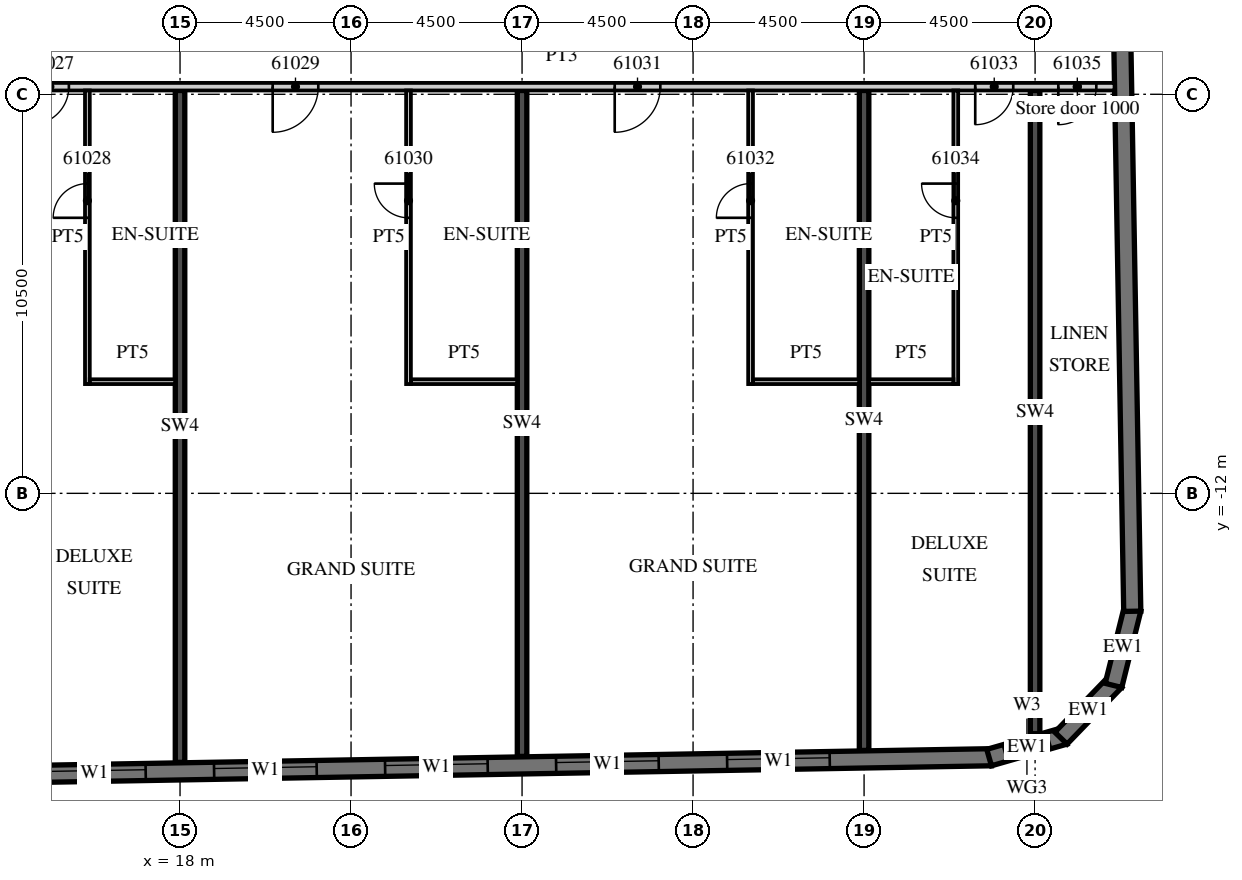
"""IFC4 building model, lengths in metres.
Left out: names, types, materials, properties, quantities, classifications, styles, units other than length and angle.
Written with IfcOpenShell. Run it as: python <this file> out.ifc"""

import sys

from ifc_helpers import new_model, si_unit, direction, frame, frame_2d, origin, place, context, subcontext, project, spatial, polyline, rectangle, outline, extrude, element, fill, save


model = new_model("IFC4")
c1 = context("Model", 3, precision=1e-05, world=origin(), true_north=direction((0.0, 1.0)))
c2 = subcontext(c1, "Body", "Model", "MODEL_VIEW")
j1 = project(units=[si_unit("LENGTHUNIT", "METRE"), si_unit("PLANEANGLEUNIT", "RADIAN")], contexts=[c1])
p1 = place(None, origin())
s1 = spatial("IfcSite", under=j1, at=p1, CompositionType="ELEMENT")
p2 = place(p1, origin())
s2 = spatial("IfcBuilding", under=s1, at=p2, CompositionType="ELEMENT")
p3 = place(p2, frame((0.0, 0.0, 247.4)))
s3 = spatial("IfcBuildingStorey", under=s2, at=p3, CompositionType="ELEMENT", Elevation=247.4)
p4 = place(p3, frame((18.0, -19.079, 0.0), z_axis=(0.0, 0.0, 1.0), x_axis=(0.0, 1.0, 0.0)))
e1 = element("IfcWall", 1, at=p4, inside=s3, PredefinedType="SHEAR", context=c2, shape_type="SweptSolid", body=[
    extrude(rectangle(XDim=17.679, YDim=0.25, at=frame_2d((8.84, 0.0))), origin(), (0.0, 0.0, 1.0), 3.3),
])
p5 = place(p3, frame((27.0, -18.922, 0.0), z_axis=(0.0, 0.0, 1.0), x_axis=(0.0, 1.0, 0.0)))
e2 = element("IfcWall", 2, at=p5, inside=s3, PredefinedType="SHEAR", context=c2, shape_type="SweptSolid", body=[
    extrude(rectangle(XDim=17.522, YDim=0.25, at=frame_2d((8.761, 0.0))), origin(), (0.0, 0.0, 1.0), 3.3),
])
p6 = place(p3, frame((36.0, -18.765, 0.0), z_axis=(0.0, 0.0, 1.0), x_axis=(0.0, 1.0, 0.0)))
e3 = element("IfcWall", 3, at=p6, inside=s3, PredefinedType="SHEAR", context=c2, shape_type="SweptSolid", body=[
    extrude(rectangle(XDim=17.365, YDim=0.25, at=frame_2d((8.683, 0.0))), origin(), (0.0, 0.0, 1.0), 3.3),
])
p7 = place(p3, frame((40.5, -18.325, 0.0), z_axis=(0.0, 0.0, 1.0), x_axis=(0.0, 1.0, 0.0)))
e4 = element("IfcWall", 4, at=p7, inside=s3, PredefinedType="SHEAR", context=c2, shape_type="SweptSolid", body=[
    extrude(rectangle(XDim=16.925, YDim=0.25, at=frame_2d((8.463, 0.0))), origin(), (0.0, 0.0, 1.0), 3.3),
])
p8 = place(p3, frame((-13.504, -19.866, 0.0), z_axis=(0.0, 0.0, 1.0), x_axis=(0.999847672978, 0.017453676992, 0.0)))
e5 = element("IfcWall", 5, at=p8, inside=s3, PredefinedType="SOLIDWALL", context=c2, shape_type="SweptSolid", body=[
    extrude(rectangle(XDim=52.86, YDim=0.45, at=frame_2d((26.43, 0.0))), origin(), (0.0, 0.0, 1.0), 3.02),
])
p9 = place(p8, frame((0.9, 0.0, 0.45)))
e6 = element("IfcOpeningElement", 6, at=p9, cuts=e5, PredefinedType="OPENING", context=c2, shape_type="SweptSolid", body=[
    extrude(rectangle(XDim=2.7, YDim=2.25, at=frame_2d((1.35, 1.125))), frame((0.0, 0.235, 0.0), z_axis=(0.0, -1.0, 0.0), x_axis=(1.0, 0.0, 0.0)), (0.0, 0.0, 1.0), 0.47),
])
p10 = place(p8, frame((5.401, 0.0, 0.45)))
e7 = element("IfcOpeningElement", 7, at=p10, cuts=e5, PredefinedType="OPENING", context=c2, shape_type="SweptSolid", body=[
    extrude(rectangle(XDim=2.7, YDim=2.25, at=frame_2d((1.35, 1.125))), frame((0.0, 0.235, 0.0), z_axis=(0.0, -1.0, 0.0), x_axis=(1.0, 0.0, 0.0)), (0.0, 0.0, 1.0), 0.47),
])
p11 = place(p8, frame((9.902, 0.0, 0.45)))
e8 = element("IfcOpeningElement", 8, at=p11, cuts=e5, PredefinedType="OPENING", context=c2, shape_type="SweptSolid", body=[
    extrude(rectangle(XDim=2.7, YDim=2.25, at=frame_2d((1.35, 1.125))), frame((0.0, 0.235, 0.0), z_axis=(0.0, -1.0, 0.0), x_axis=(1.0, 0.0, 0.0)), (0.0, 0.0, 1.0), 0.47),
])
p12 = place(p8, frame((14.402, 0.0, 0.45)))
e9 = element("IfcOpeningElement", 9, at=p12, cuts=e5, PredefinedType="OPENING", context=c2, shape_type="SweptSolid", body=[
    extrude(rectangle(XDim=2.7, YDim=2.25, at=frame_2d((1.35, 1.125))), frame((0.0, 0.235, 0.0), z_axis=(0.0, -1.0, 0.0), x_axis=(1.0, 0.0, 0.0)), (0.0, 0.0, 1.0), 0.47),
])
p13 = place(p8, frame((18.903, 0.0, 0.45)))
e10 = element("IfcOpeningElement", 10, at=p13, cuts=e5, PredefinedType="OPENING", context=c2, shape_type="SweptSolid", body=[
    extrude(rectangle(XDim=2.7, YDim=2.25, at=frame_2d((1.35, 1.125))), frame((0.0, 0.235, 0.0), z_axis=(0.0, -1.0, 0.0), x_axis=(1.0, 0.0, 0.0)), (0.0, 0.0, 1.0), 0.47),
])
p14 = place(p8, frame((23.404, 0.0, 0.45)))
e11 = element("IfcOpeningElement", 11, at=p14, cuts=e5, PredefinedType="OPENING", context=c2, shape_type="SweptSolid", body=[
    extrude(rectangle(XDim=2.7, YDim=2.25, at=frame_2d((1.35, 1.125))), frame((0.0, 0.235, 0.0), z_axis=(0.0, -1.0, 0.0), x_axis=(1.0, 0.0, 0.0)), (0.0, 0.0, 1.0), 0.47),
])
p15 = place(p8, frame((27.904, 0.0, 0.45)))
e12 = element("IfcOpeningElement", 12, at=p15, cuts=e5, PredefinedType="OPENING", context=c2, shape_type="SweptSolid", body=[
    extrude(rectangle(XDim=2.7, YDim=2.25, at=frame_2d((1.35, 1.125))), frame((0.0, 0.235, 0.0), z_axis=(0.0, -1.0, 0.0), x_axis=(1.0, 0.0, 0.0)), (0.0, 0.0, 1.0), 0.47),
])
p16 = place(p8, frame((32.405, 0.0, 0.45)))
e13 = element("IfcOpeningElement", 13, at=p16, cuts=e5, PredefinedType="OPENING", context=c2, shape_type="SweptSolid", body=[
    extrude(rectangle(XDim=2.7, YDim=2.25, at=frame_2d((1.35, 1.125))), frame((0.0, 0.235, 0.0), z_axis=(0.0, -1.0, 0.0), x_axis=(1.0, 0.0, 0.0)), (0.0, 0.0, 1.0), 0.47),
])
p17 = place(p8, frame((36.906, 0.0, 0.45)))
e14 = element("IfcOpeningElement", 14, at=p17, cuts=e5, PredefinedType="OPENING", context=c2, shape_type="SweptSolid", body=[
    extrude(rectangle(XDim=2.7, YDim=2.25, at=frame_2d((1.35, 1.125))), frame((0.0, 0.235, 0.0), z_axis=(0.0, -1.0, 0.0), x_axis=(1.0, 0.0, 0.0)), (0.0, 0.0, 1.0), 0.47),
])
p18 = place(p8, frame((41.406, 0.0, 0.45)))
e15 = element("IfcOpeningElement", 15, at=p18, cuts=e5, PredefinedType="OPENING", context=c2, shape_type="SweptSolid", body=[
    extrude(rectangle(XDim=2.7, YDim=2.25, at=frame_2d((1.35, 1.125))), frame((0.0, 0.235, 0.0), z_axis=(0.0, -1.0, 0.0), x_axis=(1.0, 0.0, 0.0)), (0.0, 0.0, 1.0), 0.47),
])
p19 = place(p8, frame((45.907, 0.0, 0.45)))
e16 = element("IfcOpeningElement", 16, at=p19, cuts=e5, PredefinedType="OPENING", context=c2, shape_type="SweptSolid", body=[
    extrude(rectangle(XDim=2.7, YDim=2.25, at=frame_2d((1.35, 1.125))), frame((0.0, 0.235, 0.0), z_axis=(0.0, -1.0, 0.0), x_axis=(1.0, 0.0, 0.0)), (0.0, 0.0, 1.0), 0.47),
])
p20 = place(p3, frame((39.29, -18.952, 0.0), z_axis=(0.0, 0.0, 1.0), x_axis=(0.961247584925, 0.275686562016, 0.0)))
e17 = element("IfcWall", 17, at=p20, inside=s3, PredefinedType="SOLIDWALL", context=c2, shape_type="SweptSolid", body=[
    extrude(outline(polyline([(0.0, -0.225), (2.071, -0.225), (1.95, 0.225), (0.121, 0.225), (0.0, -0.225)])), origin(), (0.0, 0.0, 1.0), 3.02),
])
p21 = place(p20, frame((0.435, 0.0, 0.45)))
e18 = element("IfcOpeningElement", 18, at=p21, cuts=e17, PredefinedType="OPENING", context=c2, shape_type="SweptSolid", body=[
    extrude(rectangle(XDim=1.2, YDim=2.25, at=frame_2d((0.6, 1.125))), frame((0.0, 0.235, 0.0), z_axis=(0.0, -1.0, 0.0), x_axis=(1.0, 0.0, 0.0)), (0.0, 0.0, 1.0), 0.47),
])
p22 = place(p3, frame((41.181, -18.442, 0.0), z_axis=(0.0, 0.0, 1.0), x_axis=(0.694678672846, 0.719320193998, 0.0)))
e19 = element("IfcWall", 19, at=p22, inside=s3, PredefinedType="SOLIDWALL", context=c2, shape_type="SweptSolid", body=[
    extrude(outline(polyline([(0.0, -0.225), (2.071, -0.225), (1.95, 0.225), (0.121, 0.225), (0.0, -0.225)])), origin(), (0.0, 0.0, 1.0), 3.02),
])
p23 = place(p3, frame((42.563, -17.054, 0.0), z_axis=(0.0, 0.0, 1.0), x_axis=(0.241841950319, 0.970315655375, 0.0)))
e20 = element("IfcWall", 20, at=p23, inside=s3, PredefinedType="SOLIDWALL", context=c2, shape_type="SweptSolid", body=[
    extrude(outline(polyline([(0.0, -0.225), (2.071, -0.225), (1.95, 0.225), (0.121, 0.225), (0.0, -0.225)])), origin(), (0.0, 0.0, 1.0), 3.02),
])
p24 = place(p3, frame((43.057, -15.103, 0.0), z_axis=(0.0, 0.0, 1.0), x_axis=(-0.017452408953, 0.999847695112, 0.0)))
e21 = element("IfcWall", 21, at=p24, inside=s3, PredefinedType="SOLIDWALL", context=c2, shape_type="SweptSolid", body=[
    extrude(rectangle(XDim=33.0, YDim=0.45, at=frame_2d((16.5, 0.0))), origin(), (0.0, 0.0, 1.0), 3.02),
])
p25 = place(p3, frame((13.5, -1.3, 0.0), z_axis=(0.0, 0.0, 1.0), x_axis=(1.0, 0.0, 0.0)))
e22 = element("IfcWall", 22, at=p25, inside=s3, PredefinedType="PARTITIONING", context=c2, shape_type="SweptSolid", body=[
    extrude(rectangle(XDim=29.091, YDim=0.2, at=frame_2d((14.545, 0.0))), origin(), (0.0, 0.0, 1.0), 3.02),
])
p26 = place(p25, frame((0.575, 0.0, 0.0)))
e23 = element("IfcOpeningElement", 23, at=p26, cuts=e22, PredefinedType="OPENING", context=c2, shape_type="SweptSolid", body=[
    extrude(rectangle(XDim=1.0, YDim=2.1, at=frame_2d((0.5, 1.05))), frame((0.0, 0.11, 0.0), z_axis=(0.0, -1.0, 0.0), x_axis=(1.0, 0.0, 0.0)), (0.0, 0.0, 1.0), 0.22),
])
p27 = place(p25, frame((6.938, 0.0, 0.0)))
e24 = element("IfcOpeningElement", 24, at=p27, cuts=e22, PredefinedType="OPENING", context=c2, shape_type="SweptSolid", body=[
    extrude(rectangle(XDim=1.2, YDim=2.1, at=frame_2d((0.6, 1.05))), frame((0.0, 0.11, 0.0), z_axis=(0.0, -1.0, 0.0), x_axis=(1.0, 0.0, 0.0)), (0.0, 0.0, 1.0), 0.22),
])
p28 = place(p25, frame((15.938, 0.0, 0.0)))
e25 = element("IfcOpeningElement", 25, at=p28, cuts=e22, PredefinedType="OPENING", context=c2, shape_type="SweptSolid", body=[
    extrude(rectangle(XDim=1.2, YDim=2.1, at=frame_2d((0.6, 1.05))), frame((0.0, 0.11, 0.0), z_axis=(0.0, -1.0, 0.0), x_axis=(1.0, 0.0, 0.0)), (0.0, 0.0, 1.0), 0.22),
])
p29 = place(p25, frame((25.425, 0.0, 0.0)))
e26 = element("IfcOpeningElement", 26, at=p29, cuts=e22, PredefinedType="OPENING", context=c2, shape_type="SweptSolid", body=[
    extrude(rectangle(XDim=1.0, YDim=2.1, at=frame_2d((0.5, 1.05))), frame((0.0, 0.11, 0.0), z_axis=(0.0, -1.0, 0.0), x_axis=(1.0, 0.0, 0.0)), (0.0, 0.0, 1.0), 0.22),
])
p30 = place(p25, frame((27.611, 0.0, 0.0)))
e27 = element("IfcOpeningElement", 27, at=p30, cuts=e22, PredefinedType="OPENING", context=c2, shape_type="SweptSolid", body=[
    extrude(rectangle(XDim=1.0, YDim=2.4, at=frame_2d((0.5, 1.2))), frame((0.0, 0.11, 0.0), z_axis=(0.0, -1.0, 0.0), x_axis=(1.0, 0.0, 0.0)), (0.0, 0.0, 1.0), 0.22),
])
p31 = place(p3, frame((15.562, -9.125, 0.0), z_axis=(0.0, 0.0, 1.0), x_axis=(0.0, 1.0, 0.0)))
e28 = element("IfcWall", 28, at=p31, inside=s3, PredefinedType="PARTITIONING", context=c2, shape_type="SweptSolid", body=[
    extrude(rectangle(XDim=7.725, YDim=0.125, at=frame_2d((3.863, 0.0))), origin(), (0.0, 0.0, 1.0), 3.02),
])
p32 = place(p31, frame((4.375, 0.0, 0.0)))
e29 = element("IfcOpeningElement", 29, at=p32, cuts=e28, PredefinedType="OPENING", context=c2, shape_type="SweptSolid", body=[
    extrude(rectangle(XDim=0.9, YDim=2.1, at=frame_2d((0.45, 1.05))), frame((0.0, 0.073, 0.0), z_axis=(0.0, -1.0, 0.0), x_axis=(1.0, 0.0, 0.0)), (0.0, 0.0, 1.0), 0.145),
])
p33 = place(p3, frame((15.625, -9.062, 0.0), z_axis=(0.0, 0.0, 1.0), x_axis=(1.0, 0.0, 0.0)))
e30 = element("IfcWall", 30, at=p33, inside=s3, PredefinedType="PARTITIONING", context=c2, shape_type="SweptSolid", body=[
    extrude(rectangle(XDim=2.25, YDim=0.125, at=frame_2d((1.125, 0.0))), origin(), (0.0, 0.0, 1.0), 3.02),
])
p34 = place(p3, frame((24.012, -9.125, 0.0), z_axis=(0.0, 0.0, 1.0), x_axis=(0.0, 1.0, 0.0)))
e31 = element("IfcWall", 31, at=p34, inside=s3, PredefinedType="PARTITIONING", context=c2, shape_type="SweptSolid", body=[
    extrude(rectangle(XDim=7.725, YDim=0.125, at=frame_2d((3.863, 0.0))), origin(), (0.0, 0.0, 1.0), 3.02),
])
p35 = place(p34, frame((4.375, 0.0, 0.0)))
e32 = element("IfcOpeningElement", 32, at=p35, cuts=e31, PredefinedType="OPENING", context=c2, shape_type="SweptSolid", body=[
    extrude(rectangle(XDim=0.9, YDim=2.1, at=frame_2d((0.45, 1.05))), frame((0.0, 0.073, 0.0), z_axis=(0.0, -1.0, 0.0), x_axis=(1.0, 0.0, 0.0)), (0.0, 0.0, 1.0), 0.145),
])
p36 = place(p3, frame((24.075, -9.062, 0.0), z_axis=(0.0, 0.0, 1.0), x_axis=(1.0, 0.0, 0.0)))
e33 = element("IfcWall", 33, at=p36, inside=s3, PredefinedType="PARTITIONING", context=c2, shape_type="SweptSolid", body=[
    extrude(rectangle(XDim=2.8, YDim=0.125, at=frame_2d((1.4, 0.0))), origin(), (0.0, 0.0, 1.0), 3.02),
])
p37 = place(p3, frame((33.013, -9.125, 0.0), z_axis=(0.0, 0.0, 1.0), x_axis=(0.0, 1.0, 0.0)))
e34 = element("IfcWall", 34, at=p37, inside=s3, PredefinedType="PARTITIONING", context=c2, shape_type="SweptSolid", body=[
    extrude(rectangle(XDim=7.725, YDim=0.125, at=frame_2d((3.863, 0.0))), origin(), (0.0, 0.0, 1.0), 3.02),
])
p38 = place(p37, frame((4.375, 0.0, 0.0)))
e35 = element("IfcOpeningElement", 35, at=p38, cuts=e34, PredefinedType="OPENING", context=c2, shape_type="SweptSolid", body=[
    extrude(rectangle(XDim=0.9, YDim=2.1, at=frame_2d((0.45, 1.05))), frame((0.0, 0.073, 0.0), z_axis=(0.0, -1.0, 0.0), x_axis=(1.0, 0.0, 0.0)), (0.0, 0.0, 1.0), 0.145),
])
p39 = place(p3, frame((33.075, -9.062, 0.0), z_axis=(0.0, 0.0, 1.0), x_axis=(1.0, 0.0, 0.0)))
e36 = element("IfcWall", 36, at=p39, inside=s3, PredefinedType="PARTITIONING", context=c2, shape_type="SweptSolid", body=[
    extrude(rectangle(XDim=2.8, YDim=0.125, at=frame_2d((1.4, 0.0))), origin(), (0.0, 0.0, 1.0), 3.02),
])
p40 = place(p3, frame((38.413, -9.125, 0.0), z_axis=(0.0, 0.0, 1.0), x_axis=(0.0, 1.0, 0.0)))
e37 = element("IfcWall", 37, at=p40, inside=s3, PredefinedType="PARTITIONING", context=c2, shape_type="SweptSolid", body=[
    extrude(rectangle(XDim=7.725, YDim=0.125, at=frame_2d((3.863, 0.0))), origin(), (0.0, 0.0, 1.0), 3.02),
])
p41 = place(p40, frame((4.375, 0.0, 0.0)))
e38 = element("IfcOpeningElement", 38, at=p41, cuts=e37, PredefinedType="OPENING", context=c2, shape_type="SweptSolid", body=[
    extrude(rectangle(XDim=0.9, YDim=2.1, at=frame_2d((0.45, 1.05))), frame((0.0, 0.073, 0.0), z_axis=(0.0, -1.0, 0.0), x_axis=(1.0, 0.0, 0.0)), (0.0, 0.0, 1.0), 0.145),
])
p42 = place(p3, frame((36.125, -9.062, 0.0), z_axis=(0.0, 0.0, 1.0), x_axis=(1.0, 0.0, 0.0)))
e39 = element("IfcWall", 39, at=p42, inside=s3, PredefinedType="PARTITIONING", context=c2, shape_type="SweptSolid", body=[
    extrude(rectangle(XDim=2.225, YDim=0.125, at=frame_2d((1.113, 0.0))), origin(), (0.0, 0.0, 1.0), 3.02),
])
p43 = place(p15, origin())
e40 = element("IfcWindow", 40, at=p43, inside=s3, PartitioningType="SINGLE_PANEL", PredefinedType="WINDOW", context=c2, shape_type="SweptSolid", body=[
    extrude(rectangle(XDim=2.7, YDim=2.25, at=frame_2d((1.35, 1.125))), frame((0.0, 0.09, 0.0), z_axis=(0.0, -1.0, 0.0), x_axis=(1.0, 0.0, 0.0)), (0.0, 0.0, 1.0), 0.06),
])
fill(e12, e40)
p44 = place(p16, origin())
e41 = element("IfcWindow", 41, at=p44, inside=s3, PartitioningType="SINGLE_PANEL", PredefinedType="WINDOW", context=c2, shape_type="SweptSolid", body=[
    extrude(rectangle(XDim=2.7, YDim=2.25, at=frame_2d((1.35, 1.125))), frame((0.0, 0.09, 0.0), z_axis=(0.0, -1.0, 0.0), x_axis=(1.0, 0.0, 0.0)), (0.0, 0.0, 1.0), 0.06),
])
fill(e13, e41)
p45 = place(p17, origin())
e42 = element("IfcWindow", 42, at=p45, inside=s3, PartitioningType="SINGLE_PANEL", PredefinedType="WINDOW", context=c2, shape_type="SweptSolid", body=[
    extrude(rectangle(XDim=2.7, YDim=2.25, at=frame_2d((1.35, 1.125))), frame((0.0, 0.09, 0.0), z_axis=(0.0, -1.0, 0.0), x_axis=(1.0, 0.0, 0.0)), (0.0, 0.0, 1.0), 0.06),
])
fill(e14, e42)
p46 = place(p18, origin())
e43 = element("IfcWindow", 43, at=p46, inside=s3, PartitioningType="SINGLE_PANEL", PredefinedType="WINDOW", context=c2, shape_type="SweptSolid", body=[
    extrude(rectangle(XDim=2.7, YDim=2.25, at=frame_2d((1.35, 1.125))), frame((0.0, 0.09, 0.0), z_axis=(0.0, -1.0, 0.0), x_axis=(1.0, 0.0, 0.0)), (0.0, 0.0, 1.0), 0.06),
])
fill(e15, e43)
p47 = place(p19, origin())
e44 = element("IfcWindow", 44, at=p47, inside=s3, PartitioningType="SINGLE_PANEL", PredefinedType="WINDOW", context=c2, shape_type="SweptSolid", body=[
    extrude(rectangle(XDim=2.7, YDim=2.25, at=frame_2d((1.35, 1.125))), frame((0.0, 0.09, 0.0), z_axis=(0.0, -1.0, 0.0), x_axis=(1.0, 0.0, 0.0)), (0.0, 0.0, 1.0), 0.06),
])
fill(e16, e44)
p48 = place(p21, origin())
e45 = element("IfcWindow", 45, at=p48, inside=s3, PartitioningType="SINGLE_PANEL", PredefinedType="WINDOW", context=c2, shape_type="SweptSolid", body=[
    extrude(rectangle(XDim=1.2, YDim=2.25, at=frame_2d((0.6, 1.125))), frame((0.0, 0.09, 0.0), z_axis=(0.0, -1.0, 0.0), x_axis=(1.0, 0.0, 0.0)), (0.0, 0.0, 1.0), 0.06),
])
fill(e18, e45)
p49 = place(p26, origin())
e46 = element("IfcDoor", 46, at=p49, inside=s3, OperationType="SINGLE_SWING_LEFT", PredefinedType="DOOR", context=c2, shape_type="SweptSolid", body=[
    extrude(rectangle(XDim=1.0, YDim=2.1, at=frame_2d((0.5, 1.05))), frame((0.0, 0.025, 0.0), z_axis=(0.0, -1.0, 0.0), x_axis=(1.0, 0.0, 0.0)), (0.0, 0.0, 1.0), 0.05),
])
fill(e23, e46)
p50 = place(p32, origin())
e47 = element("IfcDoor", 47, at=p50, inside=s3, OperationType="SINGLE_SWING_LEFT", PredefinedType="DOOR", context=c2, shape_type="SweptSolid", body=[
    extrude(rectangle(XDim=0.9, YDim=2.1, at=frame_2d((0.45, 1.05))), frame((0.0, 0.025, 0.0), z_axis=(0.0, -1.0, 0.0), x_axis=(1.0, 0.0, 0.0)), (0.0, 0.0, 1.0), 0.05),
])
fill(e29, e47)
p51 = place(p27, origin())
e48 = element("IfcDoor", 48, at=p51, inside=s3, OperationType="SINGLE_SWING_LEFT", PredefinedType="DOOR", context=c2, shape_type="SweptSolid", body=[
    extrude(rectangle(XDim=1.2, YDim=2.1, at=frame_2d((0.6, 1.05))), frame((0.0, 0.025, 0.0), z_axis=(0.0, -1.0, 0.0), x_axis=(1.0, 0.0, 0.0)), (0.0, 0.0, 1.0), 0.05),
])
fill(e24, e48)
p52 = place(p35, origin())
e49 = element("IfcDoor", 49, at=p52, inside=s3, OperationType="SINGLE_SWING_RIGHT", PredefinedType="DOOR", context=c2, shape_type="SweptSolid", body=[
    extrude(rectangle(XDim=0.9, YDim=2.1, at=frame_2d((0.45, 1.05))), frame((0.0, 0.025, 0.0), z_axis=(0.0, -1.0, 0.0), x_axis=(1.0, 0.0, 0.0)), (0.0, 0.0, 1.0), 0.05),
])
fill(e32, e49)
p53 = place(p28, origin())
e50 = element("IfcDoor", 50, at=p53, inside=s3, OperationType="SINGLE_SWING_LEFT", PredefinedType="DOOR", context=c2, shape_type="SweptSolid", body=[
    extrude(rectangle(XDim=1.2, YDim=2.1, at=frame_2d((0.6, 1.05))), frame((0.0, 0.025, 0.0), z_axis=(0.0, -1.0, 0.0), x_axis=(1.0, 0.0, 0.0)), (0.0, 0.0, 1.0), 0.05),
])
fill(e25, e50)
p54 = place(p38, origin())
e51 = element("IfcDoor", 51, at=p54, inside=s3, OperationType="SINGLE_SWING_LEFT", PredefinedType="DOOR", context=c2, shape_type="SweptSolid", body=[
    extrude(rectangle(XDim=0.9, YDim=2.1, at=frame_2d((0.45, 1.05))), frame((0.0, 0.025, 0.0), z_axis=(0.0, -1.0, 0.0), x_axis=(1.0, 0.0, 0.0)), (0.0, 0.0, 1.0), 0.05),
])
fill(e35, e51)
p55 = place(p29, origin())
e52 = element("IfcDoor", 52, at=p55, inside=s3, OperationType="SINGLE_SWING_LEFT", PredefinedType="DOOR", context=c2, shape_type="SweptSolid", body=[
    extrude(rectangle(XDim=1.0, YDim=2.1, at=frame_2d((0.5, 1.05))), frame((0.0, 0.025, 0.0), z_axis=(0.0, -1.0, 0.0), x_axis=(1.0, 0.0, 0.0)), (0.0, 0.0, 1.0), 0.05),
])
fill(e26, e52)
p56 = place(p41, origin())
e53 = element("IfcDoor", 53, at=p56, inside=s3, OperationType="SINGLE_SWING_RIGHT", PredefinedType="DOOR", context=c2, shape_type="SweptSolid", body=[
    extrude(rectangle(XDim=0.9, YDim=2.1, at=frame_2d((0.45, 1.05))), frame((0.0, 0.025, 0.0), z_axis=(0.0, -1.0, 0.0), x_axis=(1.0, 0.0, 0.0)), (0.0, 0.0, 1.0), 0.05),
])
fill(e38, e53)
p57 = place(p30, origin())
e54 = element("IfcDoor", 54, at=p57, inside=s3, OperationType="SINGLE_SWING_LEFT", PredefinedType="DOOR", context=c2, shape_type="SweptSolid", body=[
    extrude(rectangle(XDim=1.0, YDim=2.4, at=frame_2d((0.5, 1.2))), frame((0.0, 0.025, 0.0), z_axis=(0.0, -1.0, 0.0), x_axis=(1.0, 0.0, 0.0)), (0.0, 0.0, 1.0), 0.05),
])
fill(e27, e54)
save(model, sys.argv[1])
